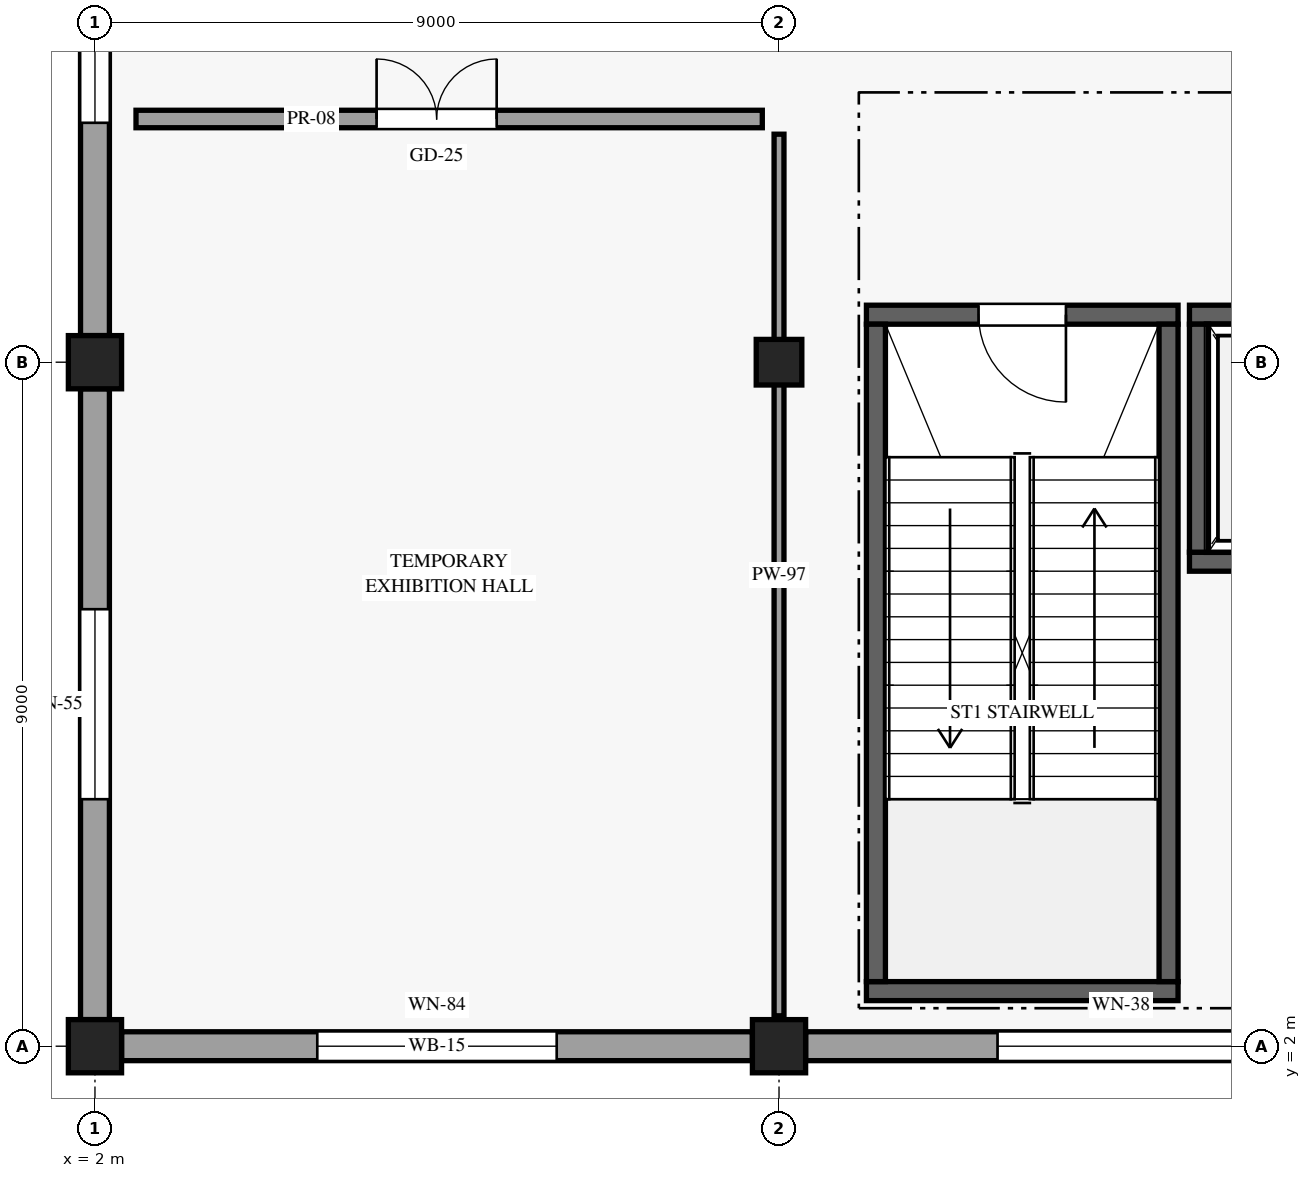
"""IFC4 building model, lengths in metres.
Left out: names, types, materials, properties, quantities, classifications, styles, units other than length and angle.
Written with IfcOpenShell. Run it as: python <this file> out.ifc"""

import sys

from ifc_helpers import new_model, si_unit, direction, frame, frame_2d, origin, origin_2d, place, context, subcontext, project, spatial, rectangle, extrude, element, fill, save


model = new_model("IFC4")
c1 = context("Model", 3, precision=1e-05, world=origin(), true_north=direction((0.0, 1.0)))
c2 = subcontext(c1, "Body", "Model", "MODEL_VIEW")
j1 = project(units=[si_unit("LENGTHUNIT", "METRE"), si_unit("PLANEANGLEUNIT", "RADIAN")], contexts=[c1])
p1 = place(None, origin())
s1 = spatial("IfcSite", under=j1, at=p1, CompositionType="ELEMENT")
p2 = place(p1, origin())
s2 = spatial("IfcBuilding", under=s1, at=p2, CompositionType="ELEMENT")
p3 = place(p2, frame((0.0, 0.0, 10.2)))
s3 = spatial("IfcBuildingStorey", under=s2, at=p3, CompositionType="ELEMENT", Elevation=10.2)
for number, where, z_axis, x_axis in (
    (1, (2.0, 2.0, 0.0), (0.0, 0.0, 1.0), (1.0, 0.0, 0.0)),
    (2, (2.0, 11.0, 0.0), (0.0, 0.0, 1.0), (1.0, 0.0, 0.0)),
    (3, (11.0, 2.0, 0.0), (0.0, 0.0, 1.0), (1.0, 0.0, 0.0)),
):
    element("IfcColumn", number, at=place(p3, frame(where, z_axis=z_axis, x_axis=x_axis)), inside=s3, PredefinedType="COLUMN", context=c2, shape_type="SweptSolid", body=[
        extrude(rectangle(XDim=0.7, YDim=0.7, at=origin_2d()), origin(), (0.0, 0.0, 1.0), 4.8),
    ])
p4 = place(p3, frame((11.0, 11.0, 0.0), z_axis=(0.0, 0.0, 1.0), x_axis=(1.0, 0.0, 0.0)))
e4 = element("IfcColumn", 4, at=p4, inside=s3, PredefinedType="COLUMN", context=c2, shape_type="SweptSolid", body=[
    extrude(rectangle(XDim=0.6, YDim=0.6, at=origin_2d()), origin(), (0.0, 0.0, 1.0), 4.8),
])
p5 = place(p3, frame((2.35, 2.0, 0.0), z_axis=(0.0, 0.0, 1.0), x_axis=(1.0, 0.0, 0.0)))
e5 = element("IfcWall", 5, at=p5, inside=s3, PredefinedType="STANDARD", context=c2, shape_type="SweptSolid", body=[
    extrude(rectangle(XDim=8.3, YDim=0.38, at=frame_2d((4.15, 0.0))), origin(), (0.0, 0.0, 1.0), 3.715),
])
p6 = place(p5, frame((5.725, 0.0, 0.85), z_axis=(0.0, 0.0, 1.0), x_axis=(-1.0, 0.0, 0.0)))
e6 = element("IfcOpeningElement", 6, at=p6, cuts=e5, PredefinedType="OPENING", context=c2, shape_type="SweptSolid", body=[
    extrude(rectangle(XDim=3.15, YDim=2.55, at=frame_2d((1.575, 1.275))), frame((0.0, 0.2, 0.0), z_axis=(0.0, -1.0, 0.0), x_axis=(1.0, 0.0, 0.0)), (0.0, 0.0, 1.0), 0.4),
])
p7 = place(p3, frame((11.35, 2.0, 0.0), z_axis=(0.0, 0.0, 1.0), x_axis=(1.0, 0.0, 0.0)))
e7 = element("IfcWall", 7, at=p7, inside=s3, PredefinedType="STANDARD", context=c2, shape_type="SweptSolid", body=[
    extrude(rectangle(XDim=8.3, YDim=0.38, at=frame_2d((4.15, 0.0))), origin(), (0.0, 0.0, 1.0), 3.715),
])
p8 = place(p7, frame((5.775, 0.0, 0.85), z_axis=(0.0, 0.0, 1.0), x_axis=(-1.0, 0.0, 0.0)))
e8 = element("IfcOpeningElement", 8, at=p8, cuts=e7, PredefinedType="OPENING", context=c2, shape_type="SweptSolid", body=[
    extrude(rectangle(XDim=3.25, YDim=2.6, at=frame_2d((1.625, 1.3))), frame((0.0, 0.2, 0.0), z_axis=(0.0, -1.0, 0.0), x_axis=(1.0, 0.0, 0.0)), (0.0, 0.0, 1.0), 0.4),
])
p9 = place(p3, frame((2.0, 2.35, 0.0), z_axis=(0.0, 0.0, 1.0), x_axis=(0.0, 1.0, 0.0)))
e9 = element("IfcWall", 9, at=p9, inside=s3, PredefinedType="STANDARD", context=c2, shape_type="SweptSolid", body=[
    extrude(rectangle(XDim=8.3, YDim=0.38, at=frame_2d((4.15, 0.0))), origin(), (0.0, 0.0, 1.0), 3.715),
])
p10 = place(p9, frame((2.9, 0.0, 0.85)))
e10 = element("IfcOpeningElement", 10, at=p10, cuts=e9, PredefinedType="OPENING", context=c2, shape_type="SweptSolid", body=[
    extrude(rectangle(XDim=2.5, YDim=2.15, at=frame_2d((1.25, 1.075))), frame((0.0, 0.2, 0.0), z_axis=(0.0, -1.0, 0.0), x_axis=(1.0, 0.0, 0.0)), (0.0, 0.0, 1.0), 0.4),
])
p11 = place(p3, frame((2.0, 11.35, 0.0), z_axis=(0.0, 0.0, 1.0), x_axis=(0.0, 1.0, 0.0)))
e11 = element("IfcWall", 11, at=p11, inside=s3, PredefinedType="STANDARD", context=c2, shape_type="SweptSolid", body=[
    extrude(rectangle(XDim=8.3, YDim=0.38, at=frame_2d((4.15, 0.0))), origin(), (0.0, 0.0, 1.0), 3.715),
])
p12 = place(p11, frame((2.8, 0.0, 0.85)))
e12 = element("IfcOpeningElement", 12, at=p12, cuts=e11, PredefinedType="OPENING", context=c2, shape_type="SweptSolid", body=[
    extrude(rectangle(XDim=2.7, YDim=2.2, at=frame_2d((1.35, 1.1))), frame((0.0, 0.2, 0.0), z_axis=(0.0, -1.0, 0.0), x_axis=(1.0, 0.0, 0.0)), (0.0, 0.0, 1.0), 0.4),
])
p13 = place(p3, frame((12.15, 11.625, 0.0), z_axis=(0.0, 0.0, 1.0), x_axis=(1.0, 0.0, 0.0)))
e13 = element("IfcWall", 13, at=p13, inside=s3, PredefinedType="SHEAR", context=c2, shape_type="SweptSolid", body=[
    extrude(rectangle(XDim=4.1, YDim=0.25, at=frame_2d((2.05, 0.0))), origin(), (0.0, 0.0, 1.0), 4.52),
])
p14 = place(p13, frame((2.625, 0.0, 0.0), z_axis=(0.0, 0.0, 1.0), x_axis=(-1.0, 0.0, 0.0)))
e14 = element("IfcOpeningElement", 14, at=p14, cuts=e13, PredefinedType="OPENING", context=c2, shape_type="SweptSolid", body=[
    extrude(rectangle(XDim=1.15, YDim=2.2, at=frame_2d((0.575, 1.1))), frame((0.0, 0.135, 0.0), z_axis=(0.0, -1.0, 0.0), x_axis=(1.0, 0.0, 0.0)), (0.0, 0.0, 1.0), 0.27),
])
p15 = place(p3, frame((12.15, 2.725, 0.0), z_axis=(0.0, 0.0, 1.0), x_axis=(1.0, 0.0, 0.0)))
e15 = element("IfcWall", 15, at=p15, inside=s3, PredefinedType="SHEAR", context=c2, shape_type="SweptSolid", body=[
    extrude(rectangle(XDim=4.1, YDim=0.25, at=frame_2d((2.05, 0.0))), origin(), (0.0, 0.0, 1.0), 4.52),
])
for number, where, z_axis, x_axis in (
    (16, (12.275, 2.85, 0.0), (0.0, 0.0, 1.0), (0.0, 1.0, 0.0)),
    (17, (16.125, 2.85, 0.0), (0.0, 0.0, 1.0), (0.0, 1.0, 0.0)),
):
    element("IfcWall", number, at=place(p3, frame(where, z_axis=z_axis, x_axis=x_axis)), inside=s3, PredefinedType="SHEAR", context=c2, shape_type="SweptSolid", body=[
        extrude(rectangle(XDim=8.65, YDim=0.25, at=frame_2d((4.325, 0.0))), origin(), (0.0, 0.0, 1.0), 4.52),
    ])
p16 = place(p3, frame((16.4, 11.625, 0.0), z_axis=(0.0, 0.0, 1.0), x_axis=(1.0, 0.0, 0.0)))
e18 = element("IfcWall", 18, at=p16, inside=s3, PredefinedType="SHEAR", context=c2, shape_type="SweptSolid", body=[
    extrude(rectangle(XDim=2.5, YDim=0.25, at=frame_2d((1.25, 0.0))), origin(), (0.0, 0.0, 1.0), 4.52),
])
p17 = place(p16, frame((0.7, 0.0, 0.0)))
e19 = element("IfcOpeningElement", 19, at=p17, cuts=e18, PredefinedType="OPENING", context=c2, shape_type="SweptSolid", body=[
    extrude(rectangle(XDim=1.1, YDim=2.2, at=frame_2d((0.55, 1.1))), frame((0.0, 0.135, 0.0), z_axis=(0.0, -1.0, 0.0), x_axis=(1.0, 0.0, 0.0)), (0.0, 0.0, 1.0), 0.27),
])
p18 = place(p3, frame((16.4, 8.375, 0.0), z_axis=(0.0, 0.0, 1.0), x_axis=(1.0, 0.0, 0.0)))
e20 = element("IfcWall", 20, at=p18, inside=s3, PredefinedType="SHEAR", context=c2, shape_type="SweptSolid", body=[
    extrude(rectangle(XDim=2.5, YDim=0.25, at=frame_2d((1.25, 0.0))), origin(), (0.0, 0.0, 1.0), 4.52),
])
p19 = place(p3, frame((16.525, 8.5, 0.0), z_axis=(0.0, 0.0, 1.0), x_axis=(0.0, 1.0, 0.0)))
e21 = element("IfcWall", 21, at=p19, inside=s3, PredefinedType="SHEAR", context=c2, shape_type="SweptSolid", body=[
    extrude(rectangle(XDim=3.0, YDim=0.25, at=frame_2d((1.5, 0.0))), origin(), (0.0, 0.0, 1.0), 4.52),
])
p20 = place(p3, frame((2.54, 14.2, 0.0), z_axis=(0.0, 0.0, 1.0), x_axis=(1.0, 0.0, 0.0)))
e22 = element("IfcWall", 22, at=p20, inside=s3, PredefinedType="PARTITIONING", context=c2, shape_type="SweptSolid", body=[
    extrude(rectangle(XDim=8.24, YDim=0.23, at=frame_2d((4.12, 0.0))), origin(), (0.0, 0.0, 1.0), 3.715),
])
p21 = place(p20, frame((3.165, 0.0, 0.0)))
e23 = element("IfcOpeningElement", 23, at=p21, cuts=e22, PredefinedType="OPENING", context=c2, shape_type="SweptSolid", body=[
    extrude(rectangle(XDim=1.58, YDim=2.38, at=frame_2d((0.79, 1.19))), frame((0.0, 0.125, 0.0), z_axis=(0.0, -1.0, 0.0), x_axis=(1.0, 0.0, 0.0)), (0.0, 0.0, 1.0), 0.25),
])
p22 = place(p3, frame((11.0, 2.4, 0.0), z_axis=(0.0, 0.0, 1.0), x_axis=(0.0, 1.0, 0.0)))
e24 = element("IfcWall", 24, at=p22, inside=s3, PredefinedType="PARTITIONING", context=c2, shape_type="SweptSolid", body=[
    extrude(rectangle(XDim=11.6, YDim=0.13, at=frame_2d((5.8, 0.0))), origin(), (0.0, 0.0, 1.0), 3.715),
])
p23 = place(p6, origin())
e25 = element("IfcWindow", 25, at=p23, inside=s3, PartitioningType="SINGLE_PANEL", PredefinedType="WINDOW", context=c2, shape_type="SweptSolid", body=[
    extrude(rectangle(XDim=3.15, YDim=2.55, at=frame_2d((1.575, 1.275))), frame((0.0, 0.03, 0.0), z_axis=(0.0, -1.0, 0.0), x_axis=(1.0, 0.0, 0.0)), (0.0, 0.0, 1.0), 0.06),
])
fill(e6, e25)
p24 = place(p8, origin())
e26 = element("IfcWindow", 26, at=p24, inside=s3, PartitioningType="SINGLE_PANEL", PredefinedType="WINDOW", context=c2, shape_type="SweptSolid", body=[
    extrude(rectangle(XDim=3.25, YDim=2.6, at=frame_2d((1.625, 1.3))), frame((0.0, 0.03, 0.0), z_axis=(0.0, -1.0, 0.0), x_axis=(1.0, 0.0, 0.0)), (0.0, 0.0, 1.0), 0.06),
])
fill(e8, e26)
p25 = place(p10, origin())
e27 = element("IfcWindow", 27, at=p25, inside=s3, PartitioningType="SINGLE_PANEL", PredefinedType="WINDOW", context=c2, shape_type="SweptSolid", body=[
    extrude(rectangle(XDim=2.5, YDim=2.15, at=frame_2d((1.25, 1.075))), frame((0.0, 0.03, 0.0), z_axis=(0.0, -1.0, 0.0), x_axis=(1.0, 0.0, 0.0)), (0.0, 0.0, 1.0), 0.06),
])
fill(e10, e27)
p26 = place(p12, origin())
e28 = element("IfcWindow", 28, at=p26, inside=s3, PartitioningType="SINGLE_PANEL", PredefinedType="WINDOW", context=c2, shape_type="SweptSolid", body=[
    extrude(rectangle(XDim=2.7, YDim=2.2, at=frame_2d((1.35, 1.1))), frame((0.0, 0.03, 0.0), z_axis=(0.0, -1.0, 0.0), x_axis=(1.0, 0.0, 0.0)), (0.0, 0.0, 1.0), 0.06),
])
fill(e12, e28)
p27 = place(p14, origin())
e29 = element("IfcDoor", 29, at=p27, inside=s3, OperationType="SINGLE_SWING_LEFT", PredefinedType="DOOR", context=c2, shape_type="SweptSolid", body=[
    extrude(rectangle(XDim=1.15, YDim=2.2, at=frame_2d((0.575, 1.1))), frame((0.0, 0.025, 0.0), z_axis=(0.0, -1.0, 0.0), x_axis=(1.0, 0.0, 0.0)), (0.0, 0.0, 1.0), 0.05),
])
fill(e14, e29)
p28 = place(p21, origin())
e30 = element("IfcDoor", 30, at=p28, inside=s3, OperationType="DOUBLE_DOOR_SINGLE_SWING", PredefinedType="DOOR", context=c2, shape_type="SweptSolid", body=[
    extrude(rectangle(XDim=1.58, YDim=2.38, at=frame_2d((0.79, 1.19))), frame((0.0, 0.025, 0.0), z_axis=(0.0, -1.0, 0.0), x_axis=(1.0, 0.0, 0.0)), (0.0, 0.0, 1.0), 0.05),
])
fill(e23, e30)
save(model, sys.argv[1])
